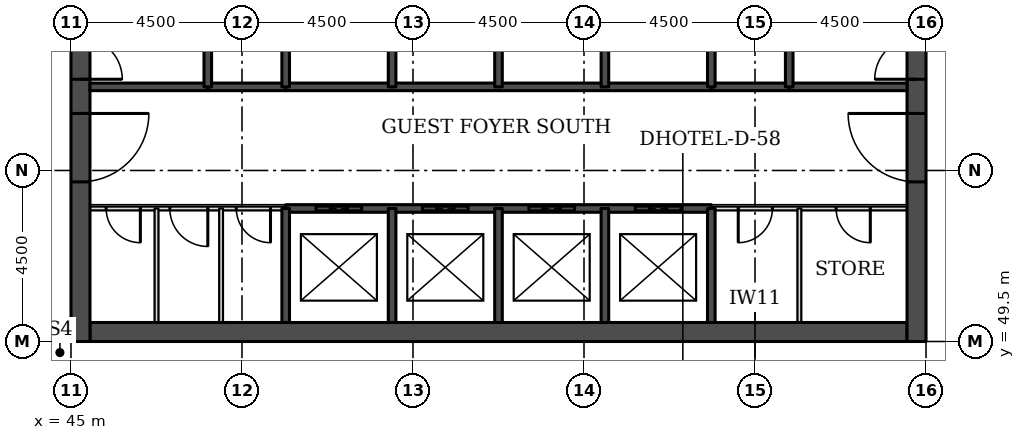
"""IFC4 building model, lengths in metres.
Left out: names, types, materials, properties, quantities, classifications, styles, units other than length and angle.
Written with IfcOpenShell. Run it as: python <this file> out.ifc"""

import sys

from ifc_helpers import new_model, si_unit, direction, frame, frame_2d, origin, place, context, subcontext, project, spatial, rectangle, extrude, element, fill, save


model = new_model("IFC4")
c1 = context("Model", 3, precision=1e-05, world=origin(), true_north=direction((0.0, 1.0)))
c2 = subcontext(c1, "Body", "Model", "MODEL_VIEW")
j1 = project(units=[si_unit("LENGTHUNIT", "METRE"), si_unit("PLANEANGLEUNIT", "RADIAN")], contexts=[c1])
p1 = place(None, origin())
s1 = spatial("IfcSite", under=j1, at=p1, CompositionType="ELEMENT")
p2 = place(p1, origin())
s2 = spatial("IfcBuilding", under=s1, at=p2, CompositionType="ELEMENT")
p3 = place(p2, frame((0.0, 0.0, 59.4)))
s3 = spatial("IfcBuildingStorey", under=s2, at=p3, CompositionType="ELEMENT", Elevation=59.4)
p4 = place(p3, frame((45.5, 49.75, 0.0), z_axis=(0.0, 0.0, 1.0), x_axis=(1.0, 0.0, 0.0)))
e1 = element("IfcWall", 1, at=p4, inside=s3, PredefinedType="SHEAR", context=c2, shape_type="SweptSolid", body=[
    extrude(rectangle(XDim=21.5, YDim=0.5, at=frame_2d((10.75, 0.0))), origin(), (0.0, 0.0, 1.0), 3.3),
])
p5 = place(p3, frame((45.25, 49.5, 0.0), z_axis=(0.0, 0.0, 1.0), x_axis=(0.0, 1.0, 0.0)))
e2 = element("IfcWall", 2, at=p5, inside=s3, PredefinedType="SHEAR", context=c2, shape_type="SweptSolid", body=[
    extrude(rectangle(XDim=22.5, YDim=0.5, at=frame_2d((11.25, 0.0))), origin(), (0.0, 0.0, 1.0), 3.3),
])
p6 = place(p5, frame((4.2, 0.0, 0.0)))
e3 = element("IfcOpeningElement", 3, at=p6, cuts=e2, PredefinedType="OPENING", context=c2, shape_type="SweptSolid", body=[
    extrude(rectangle(XDim=1.8, YDim=2.1, at=frame_2d((0.9, 1.05))), frame((0.0, 0.26, 0.0), z_axis=(0.0, -1.0, 0.0), x_axis=(1.0, 0.0, 0.0)), (0.0, 0.0, 1.0), 0.52),
])
p7 = place(p5, frame((6.9, 0.0, 0.0)))
e4 = element("IfcOpeningElement", 4, at=p7, cuts=e2, PredefinedType="OPENING", context=c2, shape_type="SweptSolid", body=[
    extrude(rectangle(XDim=1.1, YDim=2.1, at=frame_2d((0.55, 1.05))), frame((0.0, 0.26, 0.0), z_axis=(0.0, -1.0, 0.0), x_axis=(1.0, 0.0, 0.0)), (0.0, 0.0, 1.0), 0.52),
])
p8 = place(p5, frame((13.6, 0.0, 0.0)))
e5 = element("IfcOpeningElement", 5, at=p8, cuts=e2, PredefinedType="OPENING", context=c2, shape_type="SweptSolid", body=[
    extrude(rectangle(XDim=1.1, YDim=2.1, at=frame_2d((0.55, 1.05))), frame((0.0, 0.26, 0.0), z_axis=(0.0, -1.0, 0.0), x_axis=(1.0, 0.0, 0.0)), (0.0, 0.0, 1.0), 0.52),
])
p9 = place(p5, frame((16.5, 0.0, 0.0)))
e6 = element("IfcOpeningElement", 6, at=p9, cuts=e2, PredefinedType="OPENING", context=c2, shape_type="SweptSolid", body=[
    extrude(rectangle(XDim=1.8, YDim=2.1, at=frame_2d((0.9, 1.05))), frame((0.0, 0.26, 0.0), z_axis=(0.0, -1.0, 0.0), x_axis=(1.0, 0.0, 0.0)), (0.0, 0.0, 1.0), 0.52),
])
p10 = place(p3, frame((67.25, 49.5, 0.0), z_axis=(0.0, 0.0, 1.0), x_axis=(0.0, 1.0, 0.0)))
e7 = element("IfcWall", 7, at=p10, inside=s3, PredefinedType="SHEAR", context=c2, shape_type="SweptSolid", body=[
    extrude(rectangle(XDim=22.5, YDim=0.5, at=frame_2d((11.25, 0.0))), origin(), (0.0, 0.0, 1.0), 3.3),
])
p11 = place(p10, frame((4.2, 0.0, 0.0)))
e8 = element("IfcOpeningElement", 8, at=p11, cuts=e7, PredefinedType="OPENING", context=c2, shape_type="SweptSolid", body=[
    extrude(rectangle(XDim=1.8, YDim=2.1, at=frame_2d((0.9, 1.05))), frame((0.0, 0.26, 0.0), z_axis=(0.0, -1.0, 0.0), x_axis=(1.0, 0.0, 0.0)), (0.0, 0.0, 1.0), 0.52),
])
p12 = place(p10, frame((6.9, 0.0, 0.0)))
e9 = element("IfcOpeningElement", 9, at=p12, cuts=e7, PredefinedType="OPENING", context=c2, shape_type="SweptSolid", body=[
    extrude(rectangle(XDim=1.1, YDim=2.1, at=frame_2d((0.55, 1.05))), frame((0.0, 0.26, 0.0), z_axis=(0.0, -1.0, 0.0), x_axis=(1.0, 0.0, 0.0)), (0.0, 0.0, 1.0), 0.52),
])
p13 = place(p10, frame((13.6, 0.0, 0.0)))
e10 = element("IfcOpeningElement", 10, at=p13, cuts=e7, PredefinedType="OPENING", context=c2, shape_type="SweptSolid", body=[
    extrude(rectangle(XDim=1.1, YDim=2.1, at=frame_2d((0.55, 1.05))), frame((0.0, 0.26, 0.0), z_axis=(0.0, -1.0, 0.0), x_axis=(1.0, 0.0, 0.0)), (0.0, 0.0, 1.0), 0.52),
])
p14 = place(p10, frame((16.5, 0.0, 0.0)))
e11 = element("IfcOpeningElement", 11, at=p14, cuts=e7, PredefinedType="OPENING", context=c2, shape_type="SweptSolid", body=[
    extrude(rectangle(XDim=1.8, YDim=2.1, at=frame_2d((0.9, 1.05))), frame((0.0, 0.26, 0.0), z_axis=(0.0, -1.0, 0.0), x_axis=(1.0, 0.0, 0.0)), (0.0, 0.0, 1.0), 0.52),
])
p15 = place(p3, frame((45.5, 53.0, 0.0), z_axis=(0.0, 0.0, 1.0), x_axis=(1.0, 0.0, 0.0)))
e12 = element("IfcWall", 12, at=p15, inside=s3, PredefinedType="PARTITIONING", context=c2, shape_type="SweptSolid", body=[
    extrude(rectangle(XDim=5.15, YDim=0.1, at=frame_2d((2.575, 0.0))), origin(), (0.0, 0.0, 1.0), 3.08),
])
p16 = place(p15, frame((0.426, 0.0, 0.0)))
e13 = element("IfcOpeningElement", 13, at=p16, cuts=e12, PredefinedType="OPENING", context=c2, shape_type="SweptSolid", body=[
    extrude(rectangle(XDim=0.9, YDim=2.1, at=frame_2d((0.45, 1.05))), frame((0.0, 0.06, 0.0), z_axis=(0.0, -1.0, 0.0), x_axis=(1.0, 0.0, 0.0)), (0.0, 0.0, 1.0), 0.12),
])
p17 = place(p15, frame((2.101, 0.0, 0.0)))
e14 = element("IfcOpeningElement", 14, at=p17, cuts=e12, PredefinedType="OPENING", context=c2, shape_type="SweptSolid", body=[
    extrude(rectangle(XDim=1.0, YDim=2.1, at=frame_2d((0.5, 1.05))), frame((0.0, 0.06, 0.0), z_axis=(0.0, -1.0, 0.0), x_axis=(1.0, 0.0, 0.0)), (0.0, 0.0, 1.0), 0.12),
])
p18 = place(p15, frame((3.85, 0.0, 0.0)))
e15 = element("IfcOpeningElement", 15, at=p18, cuts=e12, PredefinedType="OPENING", context=c2, shape_type="SweptSolid", body=[
    extrude(rectangle(XDim=0.9, YDim=2.1, at=frame_2d((0.45, 1.05))), frame((0.0, 0.06, 0.0), z_axis=(0.0, -1.0, 0.0), x_axis=(1.0, 0.0, 0.0)), (0.0, 0.0, 1.0), 0.12),
])
p19 = place(p3, frame((61.85, 53.0, 0.0), z_axis=(0.0, 0.0, 1.0), x_axis=(1.0, 0.0, 0.0)))
e16 = element("IfcWall", 16, at=p19, inside=s3, PredefinedType="PARTITIONING", context=c2, shape_type="SweptSolid", body=[
    extrude(rectangle(XDim=5.15, YDim=0.1, at=frame_2d((2.575, 0.0))), origin(), (0.0, 0.0, 1.0), 3.08),
])
p20 = place(p19, frame((3.284, 0.0, 0.0)))
e17 = element("IfcOpeningElement", 17, at=p20, cuts=e16, PredefinedType="OPENING", context=c2, shape_type="SweptSolid", body=[
    extrude(rectangle(XDim=0.9, YDim=2.1, at=frame_2d((0.45, 1.05))), frame((0.0, 0.06, 0.0), z_axis=(0.0, -1.0, 0.0), x_axis=(1.0, 0.0, 0.0)), (0.0, 0.0, 1.0), 0.12),
])
p21 = place(p19, frame((0.709, 0.0, 0.0)))
e18 = element("IfcOpeningElement", 18, at=p21, cuts=e16, PredefinedType="OPENING", context=c2, shape_type="SweptSolid", body=[
    extrude(rectangle(XDim=0.9, YDim=2.1, at=frame_2d((0.45, 1.05))), frame((0.0, 0.06, 0.0), z_axis=(0.0, -1.0, 0.0), x_axis=(1.0, 0.0, 0.0)), (0.0, 0.0, 1.0), 0.12),
])
p22 = place(p3, frame((50.65, 53.0, 0.0), z_axis=(0.0, 0.0, 1.0), x_axis=(1.0, 0.0, 0.0)))
e19 = element("IfcWall", 19, at=p22, inside=s3, PredefinedType="SOLIDWALL", context=c2, shape_type="SweptSolid", body=[
    extrude(rectangle(XDim=11.2, YDim=0.2, at=frame_2d((5.6, 0.0))), origin(), (0.0, 0.0, 1.0), 3.08),
])
p23 = place(p22, frame((0.8, 0.0, 0.0)))
e20 = element("IfcOpeningElement", 20, at=p23, cuts=e19, PredefinedType="OPENING", context=c2, shape_type="SweptSolid", body=[
    extrude(rectangle(XDim=1.2, YDim=2.1, at=frame_2d((0.6, 1.05))), frame((0.0, 0.11, 0.0), z_axis=(0.0, -1.0, 0.0), x_axis=(1.0, 0.0, 0.0)), (0.0, 0.0, 1.0), 0.22),
])
p24 = place(p22, frame((3.6, 0.0, 0.0)))
e21 = element("IfcOpeningElement", 21, at=p24, cuts=e19, PredefinedType="OPENING", context=c2, shape_type="SweptSolid", body=[
    extrude(rectangle(XDim=1.2, YDim=2.1, at=frame_2d((0.6, 1.05))), frame((0.0, 0.11, 0.0), z_axis=(0.0, -1.0, 0.0), x_axis=(1.0, 0.0, 0.0)), (0.0, 0.0, 1.0), 0.22),
])
p25 = place(p22, frame((6.4, 0.0, 0.0)))
e22 = element("IfcOpeningElement", 22, at=p25, cuts=e19, PredefinedType="OPENING", context=c2, shape_type="SweptSolid", body=[
    extrude(rectangle(XDim=1.2, YDim=2.1, at=frame_2d((0.6, 1.05))), frame((0.0, 0.11, 0.0), z_axis=(0.0, -1.0, 0.0), x_axis=(1.0, 0.0, 0.0)), (0.0, 0.0, 1.0), 0.22),
])
p26 = place(p22, frame((9.2, 0.0, 0.0)))
e23 = element("IfcOpeningElement", 23, at=p26, cuts=e19, PredefinedType="OPENING", context=c2, shape_type="SweptSolid", body=[
    extrude(rectangle(XDim=1.2, YDim=2.1, at=frame_2d((0.6, 1.05))), frame((0.0, 0.11, 0.0), z_axis=(0.0, -1.0, 0.0), x_axis=(1.0, 0.0, 0.0)), (0.0, 0.0, 1.0), 0.22),
])
for number, where, z_axis, x_axis in (
    (24, (48.6, 56.2, 0.0), (0.0, 0.0, 1.0), (1.0, 0.0, 0.0)),
    (25, (61.85, 56.2, 0.0), (0.0, 0.0, 1.0), (1.0, 0.0, 0.0)),
):
    element("IfcWall", number, at=place(p3, frame(where, z_axis=z_axis, x_axis=x_axis)), inside=s3, PredefinedType="SOLIDWALL", context=c2, shape_type="SweptSolid", body=[
        extrude(rectangle(XDim=2.05, YDim=0.2, at=frame_2d((1.025, 0.0))), origin(), (0.0, 0.0, 1.0), 3.08),
    ])
p27 = place(p3, frame((45.5, 56.2, 0.0), z_axis=(0.0, 0.0, 1.0), x_axis=(1.0, 0.0, 0.0)))
e26 = element("IfcWall", 26, at=p27, inside=s3, PredefinedType="SOLIDWALL", context=c2, shape_type="SweptSolid", body=[
    extrude(rectangle(XDim=3.1, YDim=0.2, at=frame_2d((1.55, 0.0))), origin(), (0.0, 0.0, 1.0), 3.08),
])
p28 = place(p3, frame((50.65, 56.2, 0.0), z_axis=(0.0, 0.0, 1.0), x_axis=(1.0, 0.0, 0.0)))
e27 = element("IfcWall", 27, at=p28, inside=s3, PredefinedType="SOLIDWALL", context=c2, shape_type="SweptSolid", body=[
    extrude(rectangle(XDim=11.2, YDim=0.2, at=frame_2d((5.6, 0.0))), origin(), (0.0, 0.0, 1.0), 3.08),
])
p29 = place(p3, frame((63.9, 56.2, 0.0), z_axis=(0.0, 0.0, 1.0), x_axis=(1.0, 0.0, 0.0)))
e28 = element("IfcWall", 28, at=p29, inside=s3, PredefinedType="SOLIDWALL", context=c2, shape_type="SweptSolid", body=[
    extrude(rectangle(XDim=3.1, YDim=0.2, at=frame_2d((1.55, 0.0))), origin(), (0.0, 0.0, 1.0), 3.08),
])
p30 = place(p3, frame((47.251, 50.0, 0.0), z_axis=(0.0, 0.0, 1.0), x_axis=(0.0, 1.0, 0.0)))
e29 = element("IfcWall", 29, at=p30, inside=s3, PredefinedType="PARTITIONING", context=c2, shape_type="SweptSolid", body=[
    extrude(rectangle(XDim=3.0, YDim=0.1, at=frame_2d((1.5, 0.0))), origin(), (0.0, 0.0, 1.0), 3.08),
])
p31 = place(p3, frame((48.6, 56.2, 0.0), z_axis=(0.0, 0.0, 1.0), x_axis=(0.0, 1.0, 0.0)))
e30 = element("IfcWall", 30, at=p31, inside=s3, PredefinedType="SOLIDWALL", context=c2, shape_type="SweptSolid", body=[
    extrude(rectangle(XDim=5.8, YDim=0.2, at=frame_2d((2.9, 0.0))), origin(), (0.0, 0.0, 1.0), 3.08),
])
p32 = place(p3, frame((48.95, 50.0, 0.0), z_axis=(0.0, 0.0, 1.0), x_axis=(0.0, 1.0, 0.0)))
e31 = element("IfcWall", 31, at=p32, inside=s3, PredefinedType="PARTITIONING", context=c2, shape_type="SweptSolid", body=[
    extrude(rectangle(XDim=3.0, YDim=0.1, at=frame_2d((1.5, 0.0))), origin(), (0.0, 0.0, 1.0), 3.08),
])
p33 = place(p3, frame((50.65, 50.0, 0.0), z_axis=(0.0, 0.0, 1.0), x_axis=(0.0, 1.0, 0.0)))
e32 = element("IfcWall", 32, at=p33, inside=s3, PredefinedType="SOLIDWALL", context=c2, shape_type="SweptSolid", body=[
    extrude(rectangle(XDim=3.0, YDim=0.2, at=frame_2d((1.5, 0.0))), origin(), (0.0, 0.0, 1.0), 3.08),
])
p34 = place(p3, frame((50.65, 56.2, 0.0), z_axis=(0.0, 0.0, 1.0), x_axis=(0.0, 1.0, 0.0)))
e33 = element("IfcWall", 33, at=p34, inside=s3, PredefinedType="SOLIDWALL", context=c2, shape_type="SweptSolid", body=[
    extrude(rectangle(XDim=2.8, YDim=0.2, at=frame_2d((1.4, 0.0))), origin(), (0.0, 0.0, 1.0), 3.08),
])
p35 = place(p3, frame((53.45, 50.0, 0.0), z_axis=(0.0, 0.0, 1.0), x_axis=(0.0, 1.0, 0.0)))
e34 = element("IfcWall", 34, at=p35, inside=s3, PredefinedType="SOLIDWALL", context=c2, shape_type="SweptSolid", body=[
    extrude(rectangle(XDim=3.0, YDim=0.2, at=frame_2d((1.5, 0.0))), origin(), (0.0, 0.0, 1.0), 3.08),
])
p36 = place(p3, frame((53.45, 56.2, 0.0), z_axis=(0.0, 0.0, 1.0), x_axis=(0.0, 1.0, 0.0)))
e35 = element("IfcWall", 35, at=p36, inside=s3, PredefinedType="SOLIDWALL", context=c2, shape_type="SweptSolid", body=[
    extrude(rectangle(XDim=2.8, YDim=0.2, at=frame_2d((1.4, 0.0))), origin(), (0.0, 0.0, 1.0), 3.08),
])
p37 = place(p3, frame((56.25, 50.0, 0.0), z_axis=(0.0, 0.0, 1.0), x_axis=(0.0, 1.0, 0.0)))
e36 = element("IfcWall", 36, at=p37, inside=s3, PredefinedType="SOLIDWALL", context=c2, shape_type="SweptSolid", body=[
    extrude(rectangle(XDim=3.0, YDim=0.2, at=frame_2d((1.5, 0.0))), origin(), (0.0, 0.0, 1.0), 3.08),
])
p38 = place(p3, frame((56.25, 56.2, 0.0), z_axis=(0.0, 0.0, 1.0), x_axis=(0.0, 1.0, 0.0)))
e37 = element("IfcWall", 37, at=p38, inside=s3, PredefinedType="SOLIDWALL", context=c2, shape_type="SweptSolid", body=[
    extrude(rectangle(XDim=2.8, YDim=0.2, at=frame_2d((1.4, 0.0))), origin(), (0.0, 0.0, 1.0), 3.08),
])
p39 = place(p3, frame((59.05, 50.0, 0.0), z_axis=(0.0, 0.0, 1.0), x_axis=(0.0, 1.0, 0.0)))
e38 = element("IfcWall", 38, at=p39, inside=s3, PredefinedType="SOLIDWALL", context=c2, shape_type="SweptSolid", body=[
    extrude(rectangle(XDim=3.0, YDim=0.2, at=frame_2d((1.5, 0.0))), origin(), (0.0, 0.0, 1.0), 3.08),
])
p40 = place(p3, frame((59.05, 56.2, 0.0), z_axis=(0.0, 0.0, 1.0), x_axis=(0.0, 1.0, 0.0)))
e39 = element("IfcWall", 39, at=p40, inside=s3, PredefinedType="SOLIDWALL", context=c2, shape_type="SweptSolid", body=[
    extrude(rectangle(XDim=2.8, YDim=0.2, at=frame_2d((1.4, 0.0))), origin(), (0.0, 0.0, 1.0), 3.08),
])
p41 = place(p3, frame((61.85, 50.0, 0.0), z_axis=(0.0, 0.0, 1.0), x_axis=(0.0, 1.0, 0.0)))
e40 = element("IfcWall", 40, at=p41, inside=s3, PredefinedType="SOLIDWALL", context=c2, shape_type="SweptSolid", body=[
    extrude(rectangle(XDim=3.0, YDim=0.2, at=frame_2d((1.5, 0.0))), origin(), (0.0, 0.0, 1.0), 3.08),
])
p42 = place(p3, frame((61.85, 56.2, 0.0), z_axis=(0.0, 0.0, 1.0), x_axis=(0.0, 1.0, 0.0)))
e41 = element("IfcWall", 41, at=p42, inside=s3, PredefinedType="SOLIDWALL", context=c2, shape_type="SweptSolid", body=[
    extrude(rectangle(XDim=2.8, YDim=0.2, at=frame_2d((1.4, 0.0))), origin(), (0.0, 0.0, 1.0), 3.08),
])
p43 = place(p3, frame((63.9, 56.2, 0.0), z_axis=(0.0, 0.0, 1.0), x_axis=(0.0, 1.0, 0.0)))
e42 = element("IfcWall", 42, at=p43, inside=s3, PredefinedType="SOLIDWALL", context=c2, shape_type="SweptSolid", body=[
    extrude(rectangle(XDim=5.8, YDim=0.2, at=frame_2d((2.9, 0.0))), origin(), (0.0, 0.0, 1.0), 3.08),
])
p44 = place(p3, frame((64.167, 50.0, 0.0), z_axis=(0.0, 0.0, 1.0), x_axis=(0.0, 1.0, 0.0)))
e43 = element("IfcWall", 43, at=p44, inside=s3, PredefinedType="PARTITIONING", context=c2, shape_type="SweptSolid", body=[
    extrude(rectangle(XDim=3.0, YDim=0.1, at=frame_2d((1.5, 0.0))), origin(), (0.0, 0.0, 1.0), 3.08),
])
p45 = place(p23, origin())
e44 = element("IfcDoor", 44, at=p45, inside=s3, OperationType="DOUBLE_DOOR_SLIDING", PredefinedType="DOOR", context=c2, shape_type="SweptSolid", body=[
    extrude(rectangle(XDim=1.2, YDim=2.1, at=frame_2d((0.6, 1.05))), frame((0.0, 0.025, 0.0), z_axis=(0.0, -1.0, 0.0), x_axis=(1.0, 0.0, 0.0)), (0.0, 0.0, 1.0), 0.05),
])
fill(e20, e44)
p46 = place(p24, origin())
e45 = element("IfcDoor", 45, at=p46, inside=s3, OperationType="DOUBLE_DOOR_SLIDING", PredefinedType="DOOR", context=c2, shape_type="SweptSolid", body=[
    extrude(rectangle(XDim=1.2, YDim=2.1, at=frame_2d((0.6, 1.05))), frame((0.0, 0.025, 0.0), z_axis=(0.0, -1.0, 0.0), x_axis=(1.0, 0.0, 0.0)), (0.0, 0.0, 1.0), 0.05),
])
fill(e21, e45)
p47 = place(p25, origin())
e46 = element("IfcDoor", 46, at=p47, inside=s3, OperationType="DOUBLE_DOOR_SLIDING", PredefinedType="DOOR", context=c2, shape_type="SweptSolid", body=[
    extrude(rectangle(XDim=1.2, YDim=2.1, at=frame_2d((0.6, 1.05))), frame((0.0, 0.025, 0.0), z_axis=(0.0, -1.0, 0.0), x_axis=(1.0, 0.0, 0.0)), (0.0, 0.0, 1.0), 0.05),
])
fill(e22, e46)
p48 = place(p26, origin())
e47 = element("IfcDoor", 47, at=p48, inside=s3, OperationType="DOUBLE_DOOR_SLIDING", PredefinedType="DOOR", context=c2, shape_type="SweptSolid", body=[
    extrude(rectangle(XDim=1.2, YDim=2.1, at=frame_2d((0.6, 1.05))), frame((0.0, 0.025, 0.0), z_axis=(0.0, -1.0, 0.0), x_axis=(1.0, 0.0, 0.0)), (0.0, 0.0, 1.0), 0.05),
])
fill(e23, e47)
p49 = place(p6, frame((1.8, 0.0, 0.0), z_axis=(0.0, 0.0, 1.0), x_axis=(-1.0, 0.0, 0.0)))
e48 = element("IfcDoor", 48, at=p49, inside=s3, OperationType="SINGLE_SWING_LEFT", PredefinedType="DOOR", context=c2, shape_type="SweptSolid", body=[
    extrude(rectangle(XDim=1.8, YDim=2.1, at=frame_2d((0.9, 1.05))), frame((0.0, 0.025, 0.0), z_axis=(0.0, -1.0, 0.0), x_axis=(1.0, 0.0, 0.0)), (0.0, 0.0, 1.0), 0.05),
])
fill(e3, e48)
p50 = place(p7, frame((1.1, 0.0, 0.0), z_axis=(0.0, 0.0, 1.0), x_axis=(-1.0, 0.0, 0.0)))
e49 = element("IfcDoor", 49, at=p50, inside=s3, OperationType="SINGLE_SWING_RIGHT", PredefinedType="DOOR", context=c2, shape_type="SweptSolid", body=[
    extrude(rectangle(XDim=1.1, YDim=2.1, at=frame_2d((0.55, 1.05))), frame((0.0, 0.025, 0.0), z_axis=(0.0, -1.0, 0.0), x_axis=(1.0, 0.0, 0.0)), (0.0, 0.0, 1.0), 0.05),
])
fill(e4, e49)
p51 = place(p11, origin())
e50 = element("IfcDoor", 50, at=p51, inside=s3, OperationType="SINGLE_SWING_RIGHT", PredefinedType="DOOR", context=c2, shape_type="SweptSolid", body=[
    extrude(rectangle(XDim=1.8, YDim=2.1, at=frame_2d((0.9, 1.05))), frame((0.0, 0.025, 0.0), z_axis=(0.0, -1.0, 0.0), x_axis=(1.0, 0.0, 0.0)), (0.0, 0.0, 1.0), 0.05),
])
fill(e8, e50)
p52 = place(p12, origin())
e51 = element("IfcDoor", 51, at=p52, inside=s3, OperationType="SINGLE_SWING_LEFT", PredefinedType="DOOR", context=c2, shape_type="SweptSolid", body=[
    extrude(rectangle(XDim=1.1, YDim=2.1, at=frame_2d((0.55, 1.05))), frame((0.0, 0.025, 0.0), z_axis=(0.0, -1.0, 0.0), x_axis=(1.0, 0.0, 0.0)), (0.0, 0.0, 1.0), 0.05),
])
fill(e9, e51)
p53 = place(p20, frame((0.9, 0.0, 0.0), z_axis=(0.0, 0.0, 1.0), x_axis=(-1.0, 0.0, 0.0)))
e52 = element("IfcDoor", 52, at=p53, inside=s3, OperationType="SINGLE_SWING_LEFT", PredefinedType="DOOR", context=c2, shape_type="SweptSolid", body=[
    extrude(rectangle(XDim=0.9, YDim=2.1, at=frame_2d((0.45, 1.05))), frame((0.0, 0.025, 0.0), z_axis=(0.0, -1.0, 0.0), x_axis=(1.0, 0.0, 0.0)), (0.0, 0.0, 1.0), 0.05),
])
fill(e17, e52)
p54 = place(p21, frame((0.9, 0.0, 0.0), z_axis=(0.0, 0.0, 1.0), x_axis=(-1.0, 0.0, 0.0)))
e53 = element("IfcDoor", 53, at=p54, inside=s3, OperationType="SINGLE_SWING_RIGHT", PredefinedType="DOOR", context=c2, shape_type="SweptSolid", body=[
    extrude(rectangle(XDim=0.9, YDim=2.1, at=frame_2d((0.45, 1.05))), frame((0.0, 0.025, 0.0), z_axis=(0.0, -1.0, 0.0), x_axis=(1.0, 0.0, 0.0)), (0.0, 0.0, 1.0), 0.05),
])
fill(e18, e53)
p55 = place(p16, frame((0.9, 0.0, 0.0), z_axis=(0.0, 0.0, 1.0), x_axis=(-1.0, 0.0, 0.0)))
e54 = element("IfcDoor", 54, at=p55, inside=s3, OperationType="SINGLE_SWING_LEFT", PredefinedType="DOOR", context=c2, shape_type="SweptSolid", body=[
    extrude(rectangle(XDim=0.9, YDim=2.1, at=frame_2d((0.45, 1.05))), frame((0.0, 0.025, 0.0), z_axis=(0.0, -1.0, 0.0), x_axis=(1.0, 0.0, 0.0)), (0.0, 0.0, 1.0), 0.05),
])
fill(e13, e54)
p56 = place(p17, frame((1.0, 0.0, 0.0), z_axis=(0.0, 0.0, 1.0), x_axis=(-1.0, 0.0, 0.0)))
e55 = element("IfcDoor", 55, at=p56, inside=s3, OperationType="SINGLE_SWING_LEFT", PredefinedType="DOOR", context=c2, shape_type="SweptSolid", body=[
    extrude(rectangle(XDim=1.0, YDim=2.1, at=frame_2d((0.5, 1.05))), frame((0.0, 0.025, 0.0), z_axis=(0.0, -1.0, 0.0), x_axis=(1.0, 0.0, 0.0)), (0.0, 0.0, 1.0), 0.05),
])
fill(e14, e55)
p57 = place(p18, frame((0.9, 0.0, 0.0), z_axis=(0.0, 0.0, 1.0), x_axis=(-1.0, 0.0, 0.0)))
e56 = element("IfcDoor", 56, at=p57, inside=s3, OperationType="SINGLE_SWING_LEFT", PredefinedType="DOOR", context=c2, shape_type="SweptSolid", body=[
    extrude(rectangle(XDim=0.9, YDim=2.1, at=frame_2d((0.45, 1.05))), frame((0.0, 0.025, 0.0), z_axis=(0.0, -1.0, 0.0), x_axis=(1.0, 0.0, 0.0)), (0.0, 0.0, 1.0), 0.05),
])
fill(e15, e56)
save(model, sys.argv[1])
